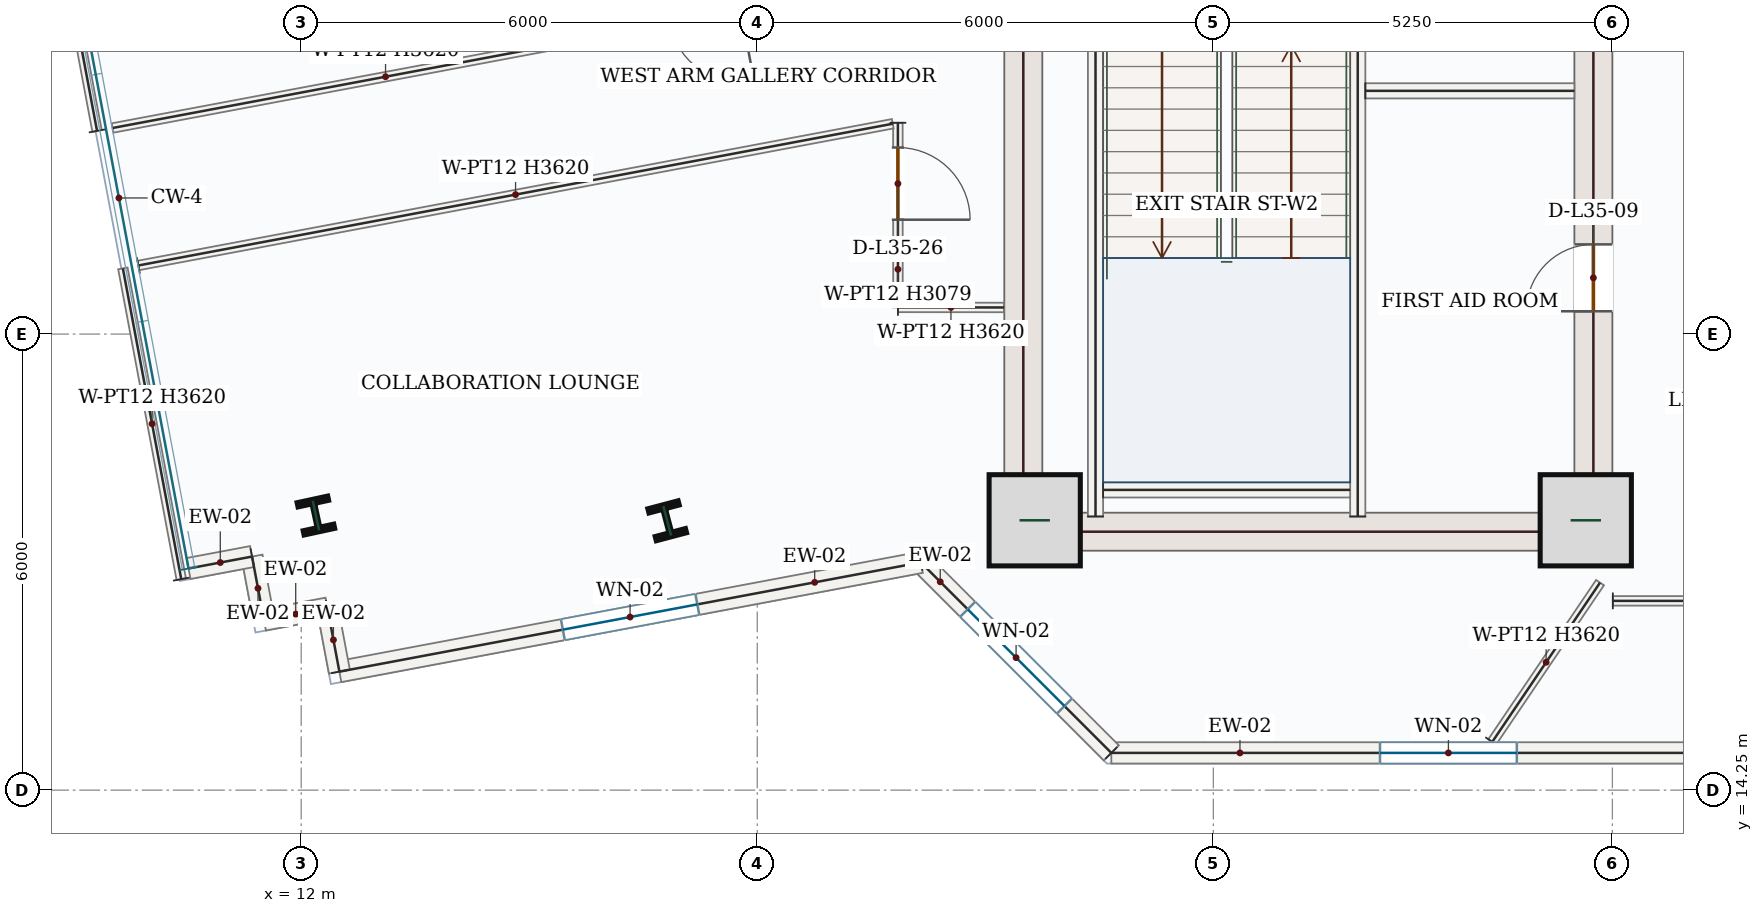
"""IFC4 building model, lengths in metres.
Left out: names, types, materials, properties, quantities, classifications, styles, units other than length and angle.
Written with IfcOpenShell. Run it as: python <this file> out.ifc"""

import sys

from ifc_helpers import new_model, si_unit, direction, frame, frame_2d, origin, origin_2d, place, context, subcontext, project, spatial, rectangle, i_section, extrude, source, transform, mapped, element, fill, save


model = new_model("IFC4")
c1 = context("Model", 3, precision=1e-05, world=origin(), true_north=direction((0.0, 1.0)))
c2 = subcontext(c1, "Body", "Model", "MODEL_VIEW")
j1 = project(units=[si_unit("LENGTHUNIT", "METRE"), si_unit("PLANEANGLEUNIT", "RADIAN")], contexts=[c1])
p1 = place(None, origin())
s1 = spatial("IfcSite", under=j1, at=p1, CompositionType="ELEMENT")
p2 = place(p1, origin())
s2 = spatial("IfcBuilding", under=s1, at=p2, CompositionType="ELEMENT")
p3 = place(p2, frame((0.0, 0.0, 155.1)))
s3 = spatial("IfcBuildingStorey", under=s2, at=p3, CompositionType="ELEMENT", Elevation=155.1)
m1 = source(origin(), c2, "Body", "SweptSolid", [
    extrude(rectangle(XDim=8.55, YDim=0.5, at=frame_2d((4.275, 0.0))), origin(), (0.0, 0.0, 1.0), 3.62),
])
p4 = place(p3, frame((21.5, 17.4, 0.0), z_axis=(0.0, 0.0, 1.0), x_axis=(0.0, 1.0, 0.0)))
e1 = element("IfcWall", 1, at=p4, inside=s3, PredefinedType="SHEAR", context=c2, shape_type="MappedRepresentation", body=[
    mapped(m1, transform((0.0, 0.0, 0.0), x_axis=(1.0, 0.0, 0.0), y_axis=(0.0, 1.0, 0.0), z_axis=(0.0, 0.0, 1.0), scale=1.0)),
])
p5 = place(p3, frame((29.0, 17.4, 0.0), z_axis=(0.0, 0.0, 1.0), x_axis=(0.0, 1.0, 0.0)))
e2 = element("IfcWall", 2, at=p5, inside=s3, PredefinedType="SHEAR", context=c2, shape_type="SweptSolid", body=[
    extrude(rectangle(XDim=8.55, YDim=0.5, at=frame_2d((4.275, 0.0))), origin(), (0.0, 0.0, 1.0), 3.62),
])
p6 = place(p5, frame((6.65, 0.0, 0.0)))
e3 = element("IfcOpeningElement", 3, at=p6, cuts=e2, PredefinedType="OPENING", context=c2, shape_type="SweptSolid", body=[
    extrude(rectangle(XDim=1.1, YDim=2.2, at=frame_2d((0.55, 1.1))), frame((0.0, 0.26, 0.0), z_axis=(0.0, -1.0, 0.0), x_axis=(1.0, 0.0, 0.0)), (0.0, 0.0, 1.0), 0.52),
])
p7 = place(p5, frame((3.15, 0.0, 0.0)))
e4 = element("IfcOpeningElement", 4, at=p7, cuts=e2, PredefinedType="OPENING", context=c2, shape_type="SweptSolid", body=[
    extrude(rectangle(XDim=0.88, YDim=2.1, at=frame_2d((0.44, 1.05))), frame((0.0, 0.26, 0.0), z_axis=(0.0, -1.0, 0.0), x_axis=(1.0, 0.0, 0.0)), (0.0, 0.0, 1.0), 0.52),
])
m2 = source(origin(), c2, "Body", "SweptSolid", [
    extrude(rectangle(XDim=7.0, YDim=0.5, at=frame_2d((3.5, 0.0))), origin(), (0.0, 0.0, 1.0), 3.62),
])
p8 = place(p3, frame((21.75, 17.65, 0.0), z_axis=(0.0, 0.0, 1.0), x_axis=(1.0, 0.0, 0.0)))
e5 = element("IfcWall", 5, at=p8, inside=s3, PredefinedType="SHEAR", context=c2, shape_type="MappedRepresentation", body=[
    mapped(m2, transform((0.0, 0.0, 0.0), x_axis=(1.0, 0.0, 0.0), y_axis=(0.0, 1.0, 0.0), z_axis=(0.0, 0.0, 1.0), scale=1.0)),
])
m3 = source(origin(), c2, "Body", "SweptSolid", [
    extrude(rectangle(XDim=1.2, YDim=1.2, at=origin_2d()), origin(), (0.0, 0.0, 1.0), 3.9),
])
for number, where, z_axis, x_axis in (
    (6, (21.65, 17.8, 0.0), (0.0, 0.0, 1.0), (1.0, 0.0, 0.0)),
    (7, (28.9, 17.8, 0.0), (0.0, 0.0, 1.0), (1.0, 0.0, 0.0)),
):
    element("IfcColumn", number, at=place(p3, frame(where, z_axis=z_axis, x_axis=x_axis)), inside=s3, PredefinedType="COLUMN", context=c2, shape_type="MappedRepresentation", body=[
        mapped(m3, transform((0.0, 0.0, 0.0), x_axis=(1.0, 0.0, 0.0), y_axis=(0.0, 1.0, 0.0), z_axis=(0.0, 0.0, 1.0), scale=1.0)),
    ])
m4 = source(origin(), c2, "Body", "SweptSolid", [
    extrude(i_section(OverallWidth=0.412, OverallDepth=0.435, WebThickness=0.036, FlangeThickness=0.057, FilletRadius=0.018, at=origin_2d()), origin(), (0.0, 0.0, 1.0), 3.9),
])
for number, where, z_axis, x_axis in (
    (8, (16.815, 17.794, 0.0), (0.0, 0.0, 1.0), (0.967, 0.255, 0.0)),
    (9, (12.193, 17.863, 0.0), (0.0, 0.0, 1.0), (0.977, 0.211, 0.0)),
):
    element("IfcColumn", number, at=place(p3, frame(where, z_axis=z_axis, x_axis=x_axis)), inside=s3, PredefinedType="COLUMN", context=c2, shape_type="MappedRepresentation", body=[
        mapped(m4, transform((0.0, 0.0, 0.0), x_axis=(1.0, 0.0, 0.0), y_axis=(0.0, 1.0, 0.0), z_axis=(0.0, 0.0, 1.0), scale=1.0)),
    ])
p9 = place(p3, frame((31.527, 14.74, 0.0), z_axis=(0.0, 0.0, 1.0), x_axis=(-1.0, 0.0, 0.0)))
e10 = element("IfcWall", 10, at=p9, inside=s3, PredefinedType="SOLIDWALL", context=c2, shape_type="SweptSolid", body=[
    extrude(rectangle(XDim=8.869, YDim=0.28, at=frame_2d((4.434, 0.0))), origin(), (0.0, 0.0, 1.0), 3.62),
])
p10 = place(p9, frame((3.534, 0.0, 0.85)))
e11 = element("IfcOpeningElement", 11, at=p10, cuts=e10, PredefinedType="OPENING", context=c2, shape_type="SweptSolid", body=[
    extrude(rectangle(XDim=1.8, YDim=1.75, at=frame_2d((0.9, 0.875))), frame((0.0, 0.15, 0.0), z_axis=(0.0, -1.0, 0.0), x_axis=(1.0, 0.0, 0.0)), (0.0, 0.0, 1.0), 0.3),
])
p11 = place(p3, frame((22.658, 14.74, 0.0), z_axis=(0.0, 0.0, 1.0), x_axis=(-0.707106781187, 0.707106781187, 0.0)))
e12 = element("IfcWall", 12, at=p11, inside=s3, PredefinedType="SOLIDWALL", context=c2, shape_type="SweptSolid", body=[
    extrude(rectangle(XDim=3.544, YDim=0.28, at=frame_2d((1.772, 0.0))), origin(), (0.0, 0.0, 1.0), 3.62),
])
p12 = place(p11, frame((0.872, 0.0, 0.85)))
e13 = element("IfcOpeningElement", 13, at=p12, cuts=e12, PredefinedType="OPENING", context=c2, shape_type="SweptSolid", body=[
    extrude(rectangle(XDim=1.8, YDim=1.75, at=frame_2d((0.9, 0.875))), frame((0.0, 0.15, 0.0), z_axis=(0.0, -1.0, 0.0), x_axis=(1.0, 0.0, 0.0)), (0.0, 0.0, 1.0), 0.3),
])
p13 = place(p3, frame((20.152, 17.246, 0.0), z_axis=(0.0, 0.0, 1.0), x_axis=(-0.982809278234, -0.18462373254, 0.0)))
e14 = element("IfcWall", 14, at=p13, inside=s3, PredefinedType="SOLIDWALL", context=c2, shape_type="SweptSolid", body=[
    extrude(rectangle(XDim=7.783, YDim=0.28, at=frame_2d((3.892, 0.0))), origin(), (0.0, 0.0, 1.0), 3.62),
])
p14 = place(p13, frame((2.992, 0.0, 0.85)))
e15 = element("IfcOpeningElement", 15, at=p14, cuts=e14, PredefinedType="OPENING", context=c2, shape_type="SweptSolid", body=[
    extrude(rectangle(XDim=1.8, YDim=1.75, at=frame_2d((0.9, 0.875))), frame((0.0, 0.15, 0.0), z_axis=(0.0, -1.0, 0.0), x_axis=(1.0, 0.0, 0.0)), (0.0, 0.0, 1.0), 0.3),
])
m5 = source(origin(), c2, "Body", "SweptSolid", [
    extrude(rectangle(XDim=0.85, YDim=0.28, at=frame_2d((0.425, 0.0))), origin(), (0.0, 0.0, 1.0), 3.62),
])
p15 = place(p3, frame((12.502, 15.809, 0.0), z_axis=(0.0, 0.0, 1.0), x_axis=(-0.184670010318, 0.982800583684, 0.0)))
e16 = element("IfcWall", 16, at=p15, inside=s3, PredefinedType="SOLIDWALL", context=c2, shape_type="MappedRepresentation", body=[
    mapped(m5, transform((0.0, 0.0, 0.0), x_axis=(1.0, 0.0, 0.0), y_axis=(0.0, 1.0, 0.0), z_axis=(0.0, 0.0, 1.0), scale=1.0)),
])
m6 = source(origin(), c2, "Body", "SweptSolid", [
    extrude(rectangle(XDim=0.85, YDim=0.28, at=frame_2d((0.425, 0.0))), origin(), (0.0, 0.0, 1.0), 3.62),
])
for number, where, z_axis, x_axis in (
    (17, (12.345, 16.645, 0.0), (0.0, 0.0, 1.0), (-0.983, -0.185, 0.0)),
    (18, (11.51, 16.488, 0.0), (0.0, 0.0, 1.0), (-0.185, 0.983, 0.0)),
):
    element("IfcWall", number, at=place(p3, frame(where, z_axis=z_axis, x_axis=x_axis)), inside=s3, PredefinedType="SOLIDWALL", context=c2, shape_type="MappedRepresentation", body=[
        mapped(m6, transform((0.0, 0.0, 0.0), x_axis=(1.0, 0.0, 0.0), y_axis=(0.0, 1.0, 0.0), z_axis=(0.0, 0.0, 1.0), scale=1.0)),
    ])
p16 = place(p3, frame((11.353, 17.323, 0.0), z_axis=(0.0, 0.0, 1.0), x_axis=(-0.982852672425, -0.184392582027, 0.0)))
e19 = element("IfcWall", 19, at=p16, inside=s3, PredefinedType="SOLIDWALL", context=c2, shape_type="MappedRepresentation", body=[
    mapped(m5, transform((0.0, 0.0, 0.0), x_axis=(1.0, 0.0, 0.0), y_axis=(0.0, 1.0, 0.0), z_axis=(0.0, 0.0, 1.0), scale=1.0)),
])
m7 = source(origin(), c2, "Body", "SweptSolid", [
    extrude(rectangle(XDim=7.87, YDim=0.2, at=frame_2d((3.935, 0.0))), origin(), (0.0, 0.0, 1.0), 3.62),
])
p17 = place(p3, frame((22.45, 17.85, 0.0), z_axis=(0.0, 0.0, 1.0), x_axis=(0.0, 1.0, 0.0)))
e20 = element("IfcWall", 20, at=p17, inside=s3, PredefinedType="SOLIDWALL", context=c2, shape_type="MappedRepresentation", body=[
    mapped(m7, transform((0.0, 0.0, 0.0), x_axis=(1.0, 0.0, 0.0), y_axis=(0.0, 1.0, 0.0), z_axis=(0.0, 0.0, 1.0), scale=1.0)),
])
p18 = place(p3, frame((25.9, 17.85, 0.0), z_axis=(0.0, 0.0, 1.0), x_axis=(0.0, 1.0, 0.0)))
e21 = element("IfcWall", 21, at=p18, inside=s3, PredefinedType="SOLIDWALL", context=c2, shape_type="SweptSolid", body=[
    extrude(rectangle(XDim=8.0, YDim=0.2, at=frame_2d((4.0, 0.0))), origin(), (0.0, 0.0, 1.0), 3.62),
])
p19 = place(p18, frame((6.3, 0.0, 0.0)))
e22 = element("IfcOpeningElement", 22, at=p19, cuts=e21, PredefinedType="OPENING", context=c2, shape_type="SweptSolid", body=[
    extrude(rectangle(XDim=1.05, YDim=2.15, at=frame_2d((0.525, 1.075))), frame((0.0, 0.11, 0.0), z_axis=(0.0, -1.0, 0.0), x_axis=(1.0, 0.0, 0.0)), (0.0, 0.0, 1.0), 0.22),
])
m8 = source(origin(), c2, "Body", "SweptSolid", [
    extrude(rectangle(XDim=3.25, YDim=0.2, at=frame_2d((1.625, 0.0))), origin(), (0.0, 0.0, 1.0), 3.62),
])
p20 = place(p3, frame((22.55, 18.2, 0.0), z_axis=(0.0, 0.0, 1.0), x_axis=(1.0, 0.0, 0.0)))
e23 = element("IfcWall", 23, at=p20, inside=s3, PredefinedType="SOLIDWALL", context=c2, shape_type="MappedRepresentation", body=[
    mapped(m8, transform((0.0, 0.0, 0.0), x_axis=(1.0, 0.0, 0.0), y_axis=(0.0, 1.0, 0.0), z_axis=(0.0, 0.0, 1.0), scale=1.0)),
])
m9 = source(origin(), c2, "Body", "SweptSolid", [
    extrude(rectangle(XDim=2.75, YDim=0.2, at=frame_2d((1.375, 0.0))), origin(), (0.0, 0.0, 1.0), 3.62),
])
p21 = place(p3, frame((26.0, 23.45, 0.0), z_axis=(0.0, 0.0, 1.0), x_axis=(1.0, 0.0, 0.0)))
e24 = element("IfcWall", 24, at=p21, inside=s3, PredefinedType="SOLIDWALL", context=c2, shape_type="MappedRepresentation", body=[
    mapped(m9, transform((0.0, 0.0, 0.0), x_axis=(1.0, 0.0, 0.0), y_axis=(0.0, 1.0, 0.0), z_axis=(0.0, 0.0, 1.0), scale=1.0)),
])
p22 = place(p3, frame((29.256, 16.74, 0.0), z_axis=(0.0, 0.0, 1.0), x_axis=(1.0, 0.0, 0.0)))
e25 = element("IfcWall", 25, at=p22, inside=s3, PredefinedType="PARTITIONING", context=c2, shape_type="SweptSolid", body=[
    extrude(rectangle(XDim=7.736, YDim=0.125, at=frame_2d((3.868, 0.0))), origin(), (0.0, 0.0, 1.0), 3.62),
])
p23 = place(p22, frame((5.293, 0.0, 0.0)))
e26 = element("IfcOpeningElement", 26, at=p23, cuts=e25, PredefinedType="OPENING", context=c2, shape_type="SweptSolid", body=[
    extrude(rectangle(XDim=0.95, YDim=2.15, at=frame_2d((0.475, 1.075))), frame((0.0, 0.073, 0.0), z_axis=(0.0, -1.0, 0.0), x_axis=(1.0, 0.0, 0.0)), (0.0, 0.0, 1.0), 0.145),
])
m10 = source(origin(), c2, "Body", "SweptSolid", [
    extrude(rectangle(XDim=2.53, YDim=0.125, at=frame_2d((1.265, 0.0))), origin(), (0.0, 0.0, 1.0), 3.62),
])
p24 = place(p3, frame((27.67, 14.885, 0.0), z_axis=(0.0, 0.0, 1.0), x_axis=(0.560455418396, 0.82818459536, 0.0)))
e27 = element("IfcWall", 27, at=p24, inside=s3, PredefinedType="PARTITIONING", context=c2, shape_type="MappedRepresentation", body=[
    mapped(m10, transform((0.0, 0.0, 0.0), x_axis=(1.0, 0.0, 0.0), y_axis=(0.0, 1.0, 0.0), z_axis=(0.0, 0.0, 1.0), scale=1.0)),
])
m11 = source(origin(), c2, "Body", "SweptSolid", [
    extrude(rectangle(XDim=4.16, YDim=0.125, at=frame_2d((2.08, 0.0))), origin(), (0.0, 0.0, 1.0), 3.62),
])
p25 = place(p3, frame((9.314, 22.923, 0.0), z_axis=(0.0, 0.0, 1.0), x_axis=(-0.184635785614, 0.982807013951, 0.0)))
e28 = element("IfcWall", 28, at=p25, inside=s3, PredefinedType="PARTITIONING", context=c2, shape_type="MappedRepresentation", body=[
    mapped(m11, transform((0.0, 0.0, 0.0), x_axis=(1.0, 0.0, 0.0), y_axis=(0.0, 1.0, 0.0), z_axis=(0.0, 0.0, 1.0), scale=1.0)),
])
p26 = place(p3, frame((19.85, 24.902, 0.0), z_axis=(0.0, 0.0, 1.0), x_axis=(-0.982804817995, -0.184647474194, 0.0)))
e29 = element("IfcWall", 29, at=p26, inside=s3, PredefinedType="PARTITIONING", context=c2, shape_type="SweptSolid", body=[
    extrude(rectangle(XDim=10.513, YDim=0.125, at=frame_2d((5.256, 0.0))), origin(), (0.0, 0.0, 1.0), 3.62),
])
p27 = place(p26, frame((2.104, 0.0, 0.0)))
e30 = element("IfcOpeningElement", 30, at=p27, cuts=e29, PredefinedType="OPENING", context=c2, shape_type="SweptSolid", body=[
    extrude(rectangle(XDim=0.95, YDim=2.15, at=frame_2d((0.475, 1.075))), frame((0.0, 0.073, 0.0), z_axis=(0.0, -1.0, 0.0), x_axis=(1.0, 0.0, 0.0)), (0.0, 0.0, 1.0), 0.145),
])
p28 = place(p3, frame((19.85, 23.03, 0.0), z_axis=(0.0, 0.0, 1.0), x_axis=(0.00040209084, -0.999999919161, 0.0)))
e31 = element("IfcWall", 31, at=p28, inside=s3, PredefinedType="PARTITIONING", context=c2, shape_type="SweptSolid", body=[
    extrude(rectangle(XDim=2.429, YDim=0.125, at=frame_2d((1.214, 0.0))), origin(), (0.0, 0.0, 1.0), 3.079),
])
p29 = place(p28, frame((0.325, 0.0, 0.0)))
e32 = element("IfcOpeningElement", 32, at=p29, cuts=e31, PredefinedType="OPENING", context=c2, shape_type="SweptSolid", body=[
    extrude(rectangle(XDim=0.95, YDim=2.15, at=frame_2d((0.475, 1.075))), frame((0.0, 0.073, 0.0), z_axis=(0.0, -1.0, 0.0), x_axis=(1.0, 0.0, 0.0)), (0.0, 0.0, 1.0), 0.145),
])
m12 = source(origin(), c2, "Body", "SweptSolid", [
    extrude(rectangle(XDim=1.394, YDim=0.125, at=frame_2d((0.697, 0.0))), origin(), (0.0, 0.0, 1.0), 3.62),
])
p30 = place(p3, frame((19.851, 20.601, 0.0), z_axis=(0.0, 0.0, 1.0), x_axis=(0.999999754632, -0.000700525222, 0.0)))
e33 = element("IfcWall", 33, at=p30, inside=s3, PredefinedType="PARTITIONING", context=c2, shape_type="MappedRepresentation", body=[
    mapped(m12, transform((0.0, 0.0, 0.0), x_axis=(1.0, 0.0, 0.0), y_axis=(0.0, 1.0, 0.0), z_axis=(0.0, 0.0, 1.0), scale=1.0)),
])
p31 = place(p3, frame((10.422, 17.026, 0.0), z_axis=(0.0, 0.0, 1.0), x_axis=(-0.184635785614, 0.982807013951, 0.0)))
e34 = element("IfcWall", 34, at=p31, inside=s3, PredefinedType="PARTITIONING", context=c2, shape_type="MappedRepresentation", body=[
    mapped(m11, transform((0.0, 0.0, 0.0), x_axis=(1.0, 0.0, 0.0), y_axis=(0.0, 1.0, 0.0), z_axis=(0.0, 0.0, 1.0), scale=1.0)),
])
m13 = source(origin(), c2, "Body", "SweptSolid", [
    extrude(rectangle(XDim=10.098, YDim=0.125, at=frame_2d((5.049, 0.0))), origin(), (0.0, 0.0, 1.0), 3.62),
])
p32 = place(p3, frame((9.858, 21.153, 0.0), z_axis=(0.0, 0.0, 1.0), x_axis=(0.982807535277, 0.1846330106, 0.0)))
e35 = element("IfcWall", 35, at=p32, inside=s3, PredefinedType="PARTITIONING", context=c2, shape_type="MappedRepresentation", body=[
    mapped(m13, transform((0.0, 0.0, 0.0), x_axis=(1.0, 0.0, 0.0), y_axis=(0.0, 1.0, 0.0), z_axis=(0.0, 0.0, 1.0), scale=1.0)),
])
m14 = source(origin(), c2, "Body", "SweptSolid", [
    extrude(rectangle(XDim=1.8, YDim=1.75, at=frame_2d((0.9, 0.875))), frame((0.0, 0.03, 0.0), z_axis=(0.0, -1.0, 0.0), x_axis=(1.0, 0.0, 0.0)), (0.0, 0.0, 1.0), 0.06),
])
p33 = place(p10, origin())
e36 = element("IfcWindow", 36, at=p33, inside=s3, PartitioningType="DOUBLE_PANEL_VERTICAL", PredefinedType="WINDOW", context=c2, shape_type="MappedRepresentation", body=[
    mapped(m14, transform((0.0, 0.0, 0.0), x_axis=(1.0, 0.0, 0.0), y_axis=(0.0, 1.0, 0.0), z_axis=(0.0, 0.0, 1.0), scale=1.0)),
])
fill(e11, e36)
p34 = place(p12, origin())
e37 = element("IfcWindow", 37, at=p34, inside=s3, PartitioningType="DOUBLE_PANEL_VERTICAL", PredefinedType="WINDOW", context=c2, shape_type="MappedRepresentation", body=[
    mapped(m14, transform((0.0, 0.0, 0.0), x_axis=(1.0, 0.0, 0.0), y_axis=(0.0, 1.0, 0.0), z_axis=(0.0, 0.0, 1.0), scale=1.0)),
])
fill(e13, e37)
p35 = place(p14, origin())
e38 = element("IfcWindow", 38, at=p35, inside=s3, PartitioningType="DOUBLE_PANEL_VERTICAL", PredefinedType="WINDOW", context=c2, shape_type="MappedRepresentation", body=[
    mapped(m14, transform((0.0, 0.0, 0.0), x_axis=(1.0, 0.0, 0.0), y_axis=(0.0, 1.0, 0.0), z_axis=(0.0, 0.0, 1.0), scale=1.0)),
])
fill(e15, e38)
m15 = source(origin(), c2, "Body", "SweptSolid", [
    extrude(rectangle(XDim=0.88, YDim=2.1, at=frame_2d((0.44, 1.05))), frame((0.0, 0.025, 0.0), z_axis=(0.0, -1.0, 0.0), x_axis=(1.0, 0.0, 0.0)), (0.0, 0.0, 1.0), 0.05),
])
p36 = place(p7, origin())
e39 = element("IfcDoor", 39, at=p36, inside=s3, OperationType="SINGLE_SWING_LEFT", PredefinedType="DOOR", context=c2, shape_type="MappedRepresentation", body=[
    mapped(m15, transform((0.0, 0.0, 0.0), x_axis=(1.0, 0.0, 0.0), y_axis=(0.0, 1.0, 0.0), z_axis=(0.0, 0.0, 1.0), scale=1.0)),
])
fill(e4, e39)
m16 = source(origin(), c2, "Body", "SweptSolid", [
    extrude(rectangle(XDim=0.95, YDim=2.15, at=frame_2d((0.475, 1.075))), frame((0.0, 0.025, 0.0), z_axis=(0.0, -1.0, 0.0), x_axis=(1.0, 0.0, 0.0)), (0.0, 0.0, 1.0), 0.05),
])
p37 = place(p29, origin())
e40 = element("IfcDoor", 40, at=p37, inside=s3, OperationType="SINGLE_SWING_RIGHT", PredefinedType="DOOR", context=c2, shape_type="MappedRepresentation", body=[
    mapped(m16, transform((0.0, 0.0, 0.0), x_axis=(1.0, 0.0, 0.0), y_axis=(0.0, 1.0, 0.0), z_axis=(0.0, 0.0, 1.0), scale=1.0)),
])
fill(e32, e40)
save(model, sys.argv[1])
